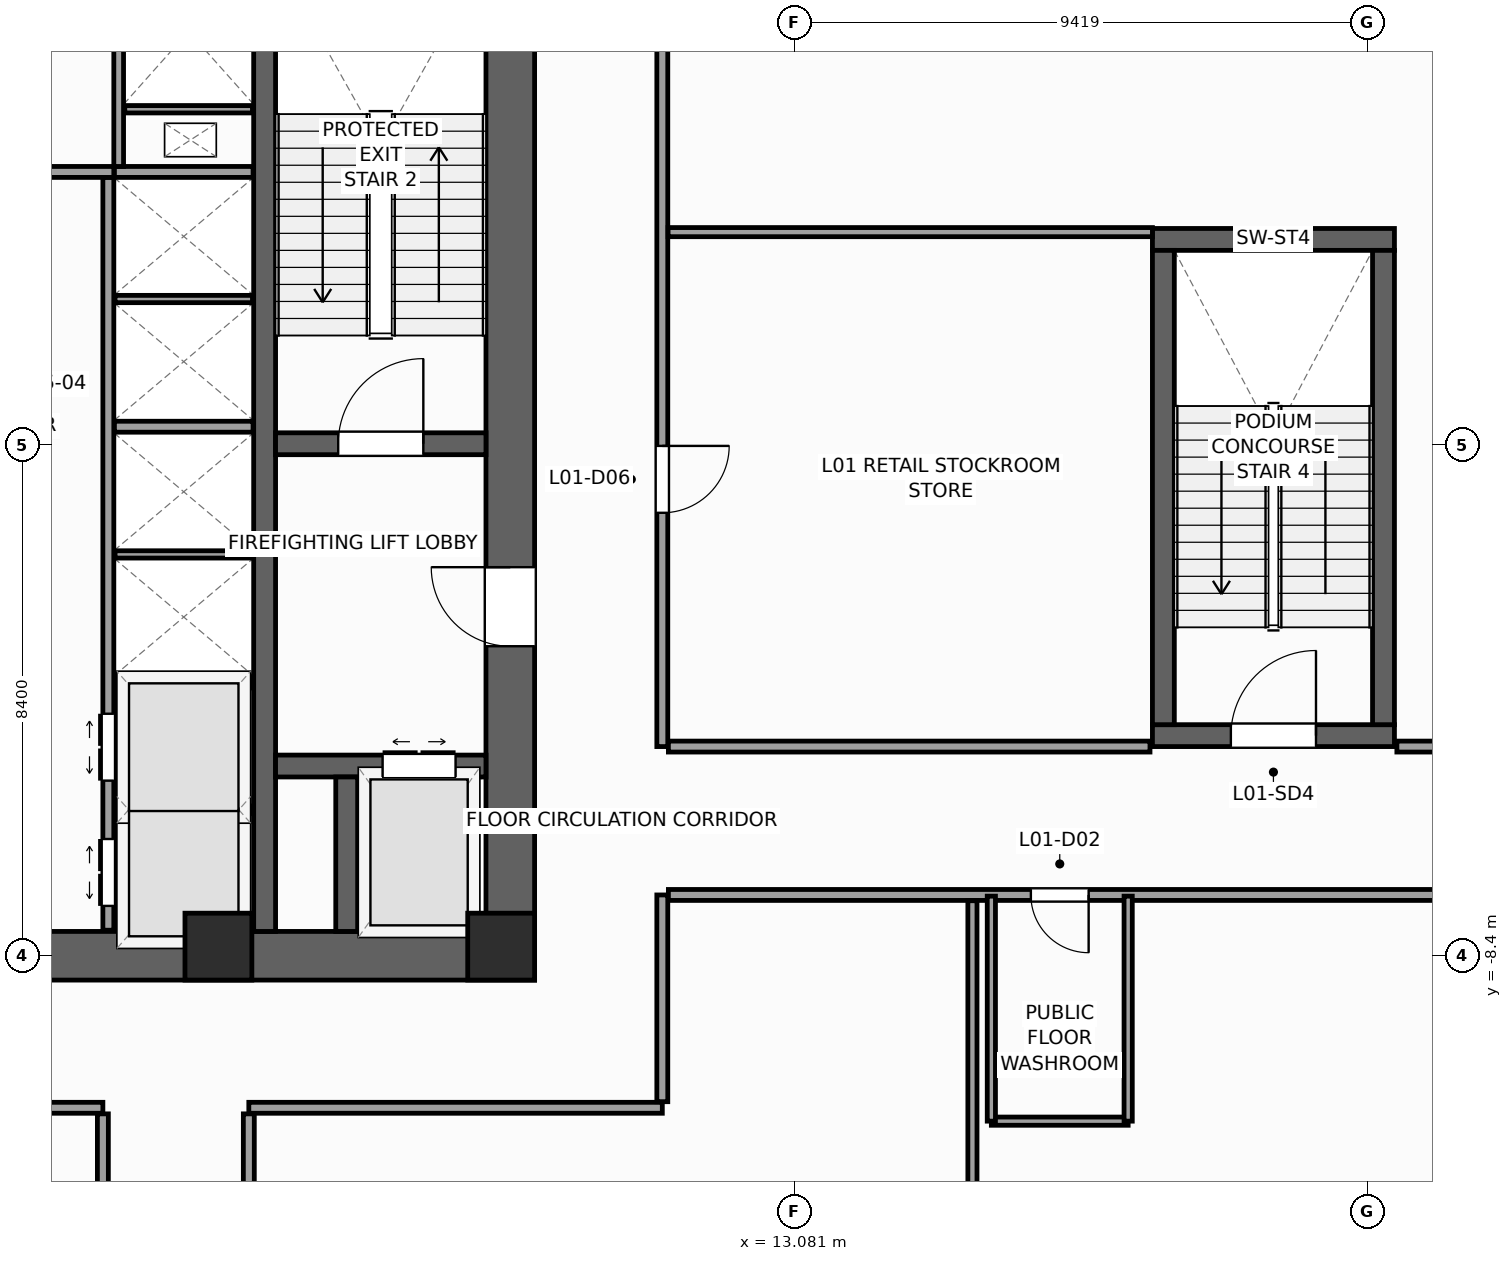
"""IFC4 building model, lengths in metres.
Left out: names, types, materials, properties, quantities, classifications, styles, units other than length and angle.
Written with IfcOpenShell. Run it as: python <this file> out.ifc"""

import sys

from ifc_helpers import new_model, si_unit, direction, frame, frame_2d, origin, origin_2d, place, context, subcontext, project, spatial, rectangle, extrude, source, transform, mapped, element, fill, save


model = new_model("IFC4")
c1 = context("Model", 3, precision=1e-05, world=origin(), true_north=direction((0.0, 1.0)))
c2 = subcontext(c1, "Body", "Model", "MODEL_VIEW")
j1 = project(units=[si_unit("LENGTHUNIT", "METRE"), si_unit("PLANEANGLEUNIT", "RADIAN")], contexts=[c1])
p1 = place(None, origin())
s1 = spatial("IfcSite", under=j1, at=p1, CompositionType="ELEMENT")
p2 = place(p1, origin())
s2 = spatial("IfcBuilding", under=s1, at=p2, CompositionType="ELEMENT")
p3 = place(p2, frame((0.0, 0.0, 6.0)))
s3 = spatial("IfcBuildingStorey", under=s2, at=p3, CompositionType="ELEMENT", Elevation=6.0)
p4 = place(p3, frame((-8.8, -8.4, 0.0), z_axis=(0.0, 0.0, 1.0), x_axis=(1.0, 0.0, 0.0)))
e1 = element("IfcWall", 1, at=p4, inside=s3, PredefinedType="SHEAR", context=c2, shape_type="SweptSolid", body=[
    extrude(rectangle(XDim=17.6, YDim=0.8, at=frame_2d((8.8, 0.0))), origin(), (0.0, 0.0, 1.0), 5.0),
])
p5 = place(p4, frame((8.15, 0.0, 0.0)))
e2 = element("IfcOpeningElement", 2, at=p5, cuts=e1, PredefinedType="OPENING", context=c2, shape_type="SweptSolid", body=[
    extrude(rectangle(XDim=1.3, YDim=2.2, at=frame_2d((0.65, 1.1))), frame((0.0, 0.41, 0.0), z_axis=(0.0, -1.0, 0.0), x_axis=(1.0, 0.0, 0.0)), (0.0, 0.0, 1.0), 0.82),
])
p6 = place(p3, frame((8.4, -8.0, 0.0), z_axis=(0.0, 0.0, 1.0), x_axis=(0.0, 1.0, 0.0)))
e3 = element("IfcWall", 3, at=p6, inside=s3, PredefinedType="SHEAR", context=c2, shape_type="SweptSolid", body=[
    extrude(rectangle(XDim=16.0, YDim=0.8, at=frame_2d((8.0, 0.0))), origin(), (0.0, 0.0, 1.0), 5.0),
])
p7 = place(p6, frame((4.69, 0.0, 0.0)))
e4 = element("IfcOpeningElement", 4, at=p7, cuts=e3, PredefinedType="OPENING", context=c2, shape_type="SweptSolid", body=[
    extrude(rectangle(XDim=1.3, YDim=2.2, at=frame_2d((0.65, 1.1))), frame((0.0, 0.41, 0.0), z_axis=(0.0, -1.0, 0.0), x_axis=(1.0, 0.0, 0.0)), (0.0, 0.0, 1.0), 0.82),
])
p8 = place(p3, frame((4.36, -8.0, 0.0), z_axis=(0.0, 0.0, 1.0), x_axis=(0.0, 1.0, 0.0)))
e5 = element("IfcWall", 5, at=p8, inside=s3, PredefinedType="SHEAR", context=c2, shape_type="SweptSolid", body=[
    extrude(rectangle(XDim=16.0, YDim=0.36, at=frame_2d((8.0, 0.0))), origin(), (0.0, 0.0, 1.0), 5.0),
])
p9 = place(p3, frame((4.54, 0.02, 0.0), z_axis=(0.0, 0.0, 1.0), x_axis=(1.0, 0.0, 0.0)))
e6 = element("IfcWall", 6, at=p9, inside=s3, PredefinedType="SHEAR", context=c2, shape_type="SweptSolid", body=[
    extrude(rectangle(XDim=3.46, YDim=0.36, at=frame_2d((1.73, 0.0))), origin(), (0.0, 0.0, 1.0), 5.0),
])
p10 = place(p9, frame((1.03, 0.0, 0.0)))
e7 = element("IfcOpeningElement", 7, at=p10, cuts=e6, PredefinedType="OPENING", context=c2, shape_type="SweptSolid", body=[
    extrude(rectangle(XDim=1.4, YDim=2.2, at=frame_2d((0.7, 1.1))), frame((0.0, 0.19, 0.0), z_axis=(0.0, -1.0, 0.0), x_axis=(1.0, 0.0, 0.0)), (0.0, 0.0, 1.0), 0.38),
])
p11 = place(p3, frame((4.54, -5.28, 0.0), z_axis=(0.0, 0.0, 1.0), x_axis=(1.0, 0.0, 0.0)))
e8 = element("IfcWall", 8, at=p11, inside=s3, PredefinedType="SHEAR", context=c2, shape_type="SweptSolid", body=[
    extrude(rectangle(XDim=3.46, YDim=0.36, at=frame_2d((1.73, 0.0))), origin(), (0.0, 0.0, 1.0), 5.0),
])
p12 = place(p11, frame((1.76, 0.0, 0.0)))
e9 = element("IfcOpeningElement", 9, at=p12, cuts=e8, PredefinedType="OPENING", context=c2, shape_type="SweptSolid", body=[
    extrude(rectangle(XDim=1.2, YDim=2.25, at=frame_2d((0.6, 1.125))), frame((0.0, 0.19, 0.0), z_axis=(0.0, -1.0, 0.0), x_axis=(1.0, 0.0, 0.0)), (0.0, 0.0, 1.0), 0.38),
])
p13 = place(p3, frame((5.71, -8.0, 0.0), z_axis=(0.0, 0.0, 1.0), x_axis=(0.0, 1.0, 0.0)))
e10 = element("IfcWall", 10, at=p13, inside=s3, PredefinedType="SHEAR", context=c2, shape_type="SweptSolid", body=[
    extrude(rectangle(XDim=2.54, YDim=0.36, at=frame_2d((1.27, 0.0))), origin(), (0.0, 0.0, 1.0), 5.0),
])
p14 = place(p3, frame((18.96, -4.78, 0.0), z_axis=(0.0, 0.0, 1.0), x_axis=(1.0, 0.0, 0.0)))
e11 = element("IfcWall", 11, at=p14, inside=s3, PredefinedType="SHEAR", context=c2, shape_type="SweptSolid", body=[
    extrude(rectangle(XDim=3.98, YDim=0.36, at=frame_2d((1.99, 0.0))), origin(), (0.0, 0.0, 1.0), 5.0),
])
p15 = place(p14, frame((1.29, 0.0, 0.0)))
e12 = element("IfcOpeningElement", 12, at=p15, cuts=e11, PredefinedType="OPENING", context=c2, shape_type="SweptSolid", body=[
    extrude(rectangle(XDim=1.4, YDim=2.2, at=frame_2d((0.7, 1.1))), frame((0.0, 0.19, 0.0), z_axis=(0.0, -1.0, 0.0), x_axis=(1.0, 0.0, 0.0)), (0.0, 0.0, 1.0), 0.38),
])
p16 = place(p3, frame((18.96, 3.38, 0.0), z_axis=(0.0, 0.0, 1.0), x_axis=(1.0, 0.0, 0.0)))
e13 = element("IfcWall", 13, at=p16, inside=s3, PredefinedType="SHEAR", context=c2, shape_type="SweptSolid", body=[
    extrude(rectangle(XDim=3.98, YDim=0.36, at=frame_2d((1.99, 0.0))), origin(), (0.0, 0.0, 1.0), 5.0),
])
for number, where, z_axis, x_axis in (
    (14, (19.14, -4.6, 0.0), (0.0, 0.0, 1.0), (0.0, 1.0, 0.0)),
    (15, (22.76, -4.6, 0.0), (0.0, 0.0, 1.0), (0.0, 1.0, 0.0)),
):
    element("IfcWall", number, at=place(p3, frame(where, z_axis=z_axis, x_axis=x_axis)), inside=s3, PredefinedType="SHEAR", context=c2, shape_type="SweptSolid", body=[
        extrude(rectangle(XDim=7.8, YDim=0.36, at=frame_2d((3.9, 0.0))), origin(), (0.0, 0.0, 1.0), 5.0),
    ])
m1 = source(origin(), c2, "Body", "SweptSolid", [
    extrude(rectangle(XDim=1.1, YDim=1.1, at=origin_2d()), origin(), (0.0, 0.0, 1.0), 5.0),
])
for number, where, z_axis, x_axis in (
    (16, (8.25, -8.25, 0.0), (0.0, 0.0, 1.0), (1.0, 0.0, 0.0)),
    (17, (3.6, -8.25, 0.0), (0.0, 0.0, 1.0), (1.0, 0.0, 0.0)),
):
    element("IfcColumn", number, at=place(p3, frame(where, z_axis=z_axis, x_axis=x_axis)), inside=s3, PredefinedType="PILASTER", context=c2, shape_type="MappedRepresentation", body=[
        mapped(m1, transform((0.0, 0.0, 0.0), scale=1.0)),
    ])
p17 = place(p3, frame((1.79, -7.98, 0.0), z_axis=(0.0, 0.0, 1.0), x_axis=(0.0, 1.0, 0.0)))
e18 = element("IfcWall", 18, at=p17, inside=s3, PredefinedType="PARTITIONING", context=c2, shape_type="SweptSolid", body=[
    extrude(rectangle(XDim=12.38, YDim=0.18, at=frame_2d((6.19, 0.0))), origin(), (0.0, 0.0, 1.0), 4.66),
])
p18 = place(p17, frame((0.4, 0.0, 0.0)))
e19 = element("IfcOpeningElement", 19, at=p18, cuts=e18, PredefinedType="OPENING", context=c2, shape_type="SweptSolid", body=[
    extrude(rectangle(XDim=1.1, YDim=2.2, at=frame_2d((0.55, 1.1))), frame((0.0, 0.1, 0.0), z_axis=(0.0, -1.0, 0.0), x_axis=(1.0, 0.0, 0.0)), (0.0, 0.0, 1.0), 0.2),
])
p19 = place(p17, frame((2.46, 0.0, 0.0)))
e20 = element("IfcOpeningElement", 20, at=p19, cuts=e18, PredefinedType="OPENING", context=c2, shape_type="SweptSolid", body=[
    extrude(rectangle(XDim=1.1, YDim=2.2, at=frame_2d((0.55, 1.1))), frame((0.0, 0.1, 0.0), z_axis=(0.0, -1.0, 0.0), x_axis=(1.0, 0.0, 0.0)), (0.0, 0.0, 1.0), 0.2),
])
p20 = place(p3, frame((-1.88, 4.49, 0.0), z_axis=(0.0, 0.0, 1.0), x_axis=(1.0, 0.0, 0.0)))
e21 = element("IfcWall", 21, at=p20, inside=s3, PredefinedType="PARTITIONING", context=c2, shape_type="SweptSolid", body=[
    extrude(rectangle(XDim=3.76, YDim=0.18, at=frame_2d((1.88, 0.0))), origin(), (0.0, 0.0, 1.0), 4.66),
])
p21 = place(p20, frame((1.305, 0.0, 0.0)))
e22 = element("IfcOpeningElement", 22, at=p21, cuts=e21, PredefinedType="OPENING", context=c2, shape_type="SweptSolid", body=[
    extrude(rectangle(XDim=1.15, YDim=2.25, at=frame_2d((0.575, 1.125))), frame((0.0, 0.1, 0.0), z_axis=(0.0, -1.0, 0.0), x_axis=(1.0, 0.0, 0.0)), (0.0, 0.0, 1.0), 0.2),
])
for number, where, z_axis, x_axis in (
    (23, (1.89, -3.9, 0.0), (0.0, 0.0, 1.0), (1.0, 0.0, 0.0)),
    (24, (1.89, 0.3, 0.0), (0.0, 0.0, 1.0), (1.0, 0.0, 0.0)),
    (25, (1.89, 4.49, 0.0), (0.0, 0.0, 1.0), (1.0, 0.0, 0.0)),
):
    element("IfcWall", number, at=place(p3, frame(where, z_axis=z_axis, x_axis=x_axis)), inside=s3, PredefinedType="PARTITIONING", context=c2, shape_type="SweptSolid", body=[
        extrude(rectangle(XDim=2.28, YDim=0.18, at=frame_2d((1.14, 0.0))), origin(), (0.0, 0.0, 1.0), 4.66),
    ])
for number, where, z_axis, x_axis in (
    (26, (1.9, -6.0, 0.0), (0.0, 0.0, 1.0), (1.0, 0.0, 0.0)),
    (27, (1.9, -1.8, 0.0), (0.0, 0.0, 1.0), (1.0, 0.0, 0.0)),
    (28, (1.9, 2.4, 0.0), (0.0, 0.0, 1.0), (1.0, 0.0, 0.0)),
):
    element("IfcWall", number, at=place(p3, frame(where, z_axis=z_axis, x_axis=x_axis)), inside=s3, PredefinedType="PARTITIONING", context=c2, shape_type="SweptSolid", body=[
        extrude(rectangle(XDim=2.26, YDim=0.12, at=frame_2d((1.13, 0.0))), origin(), (0.0, 0.0, 1.0), 4.66),
    ])
p22 = place(p3, frame((1.96, 4.58, 0.0), z_axis=(0.0, 0.0, 1.0), x_axis=(0.0, 1.0, 0.0)))
e29 = element("IfcWall", 29, at=p22, inside=s3, PredefinedType="PARTITIONING", context=c2, shape_type="SweptSolid", body=[
    extrude(rectangle(XDim=3.4, YDim=0.16, at=frame_2d((1.7, 0.0))), origin(), (0.0, 0.0, 1.0), 4.66),
])
p23 = place(p3, frame((2.06, 5.52, 0.0), z_axis=(0.0, 0.0, 1.0), x_axis=(1.0, 0.0, 0.0)))
e30 = element("IfcWall", 30, at=p23, inside=s3, PredefinedType="PARTITIONING", context=c2, shape_type="SweptSolid", body=[
    extrude(rectangle(XDim=2.1, YDim=0.12, at=frame_2d((1.05, 0.0))), origin(), (0.0, 0.0, 1.0), 4.66),
])
p24 = place(p3, frame((-10.9, -10.9, 0.0), z_axis=(0.0, 0.0, 1.0), x_axis=(1.0, 0.0, 0.0)))
e31 = element("IfcWall", 31, at=p24, inside=s3, PredefinedType="PARTITIONING", context=c2, shape_type="SweptSolid", body=[
    extrude(rectangle(XDim=12.6, YDim=0.18, at=frame_2d((6.3, 0.0))), origin(), (0.0, 0.0, 1.0), 4.66),
])
p25 = place(p3, frame((4.1, -10.9, 0.0), z_axis=(0.0, 0.0, 1.0), x_axis=(1.0, 0.0, 0.0)))
e32 = element("IfcWall", 32, at=p25, inside=s3, PredefinedType="PARTITIONING", context=c2, shape_type="SweptSolid", body=[
    extrude(rectangle(XDim=6.8, YDim=0.18, at=frame_2d((3.4, 0.0))), origin(), (0.0, 0.0, 1.0), 4.66),
])
p26 = place(p3, frame((10.9, -10.8, 0.0), z_axis=(0.0, 0.0, 1.0), x_axis=(0.0, 1.0, 0.0)))
e33 = element("IfcWall", 33, at=p26, inside=s3, PredefinedType="PARTITIONING", context=c2, shape_type="SweptSolid", body=[
    extrude(rectangle(XDim=3.4, YDim=0.18, at=frame_2d((1.7, 0.0))), origin(), (0.0, 0.0, 1.0), 4.66),
])
p27 = place(p3, frame((10.9, -4.96, 0.0), z_axis=(0.0, 0.0, 1.0), x_axis=(0.0, 1.0, 0.0)))
e34 = element("IfcWall", 34, at=p27, inside=s3, PredefinedType="PARTITIONING", context=c2, shape_type="SweptSolid", body=[
    extrude(rectangle(XDim=15.76, YDim=0.18, at=frame_2d((7.88, 0.0))), origin(), (0.0, 0.0, 1.0), 4.66),
])
p28 = place(p27, frame((3.844, 0.0, 0.0)))
e35 = element("IfcOpeningElement", 35, at=p28, cuts=e34, PredefinedType="OPENING", context=c2, shape_type="SweptSolid", body=[
    extrude(rectangle(XDim=1.1, YDim=2.2, at=frame_2d((0.55, 1.1))), frame((0.0, 0.1, 0.0), z_axis=(0.0, -1.0, 0.0), x_axis=(1.0, 0.0, 0.0)), (0.0, 0.0, 1.0), 0.2),
])
p29 = place(p3, frame((11.0, -7.4, 0.0), z_axis=(0.0, 0.0, 1.0), x_axis=(1.0, 0.0, 0.0)))
e36 = element("IfcWall", 36, at=p29, inside=s3, PredefinedType="PARTITIONING", context=c2, shape_type="SweptSolid", body=[
    extrude(rectangle(XDim=27.665, YDim=0.18, at=frame_2d((13.833, 0.0))), origin(), (0.0, 0.0, 1.0), 4.66),
])
p30 = place(p29, frame((5.961, 0.0, 0.0)))
e37 = element("IfcOpeningElement", 37, at=p30, cuts=e36, PredefinedType="OPENING", context=c2, shape_type="SweptSolid", body=[
    extrude(rectangle(XDim=0.95, YDim=2.1, at=frame_2d((0.475, 1.05))), frame((0.0, 0.1, 0.0), z_axis=(0.0, -1.0, 0.0), x_axis=(1.0, 0.0, 0.0)), (0.0, 0.0, 1.0), 0.2),
])
p31 = place(p29, frame((16.893, 0.0, 0.0)))
e38 = element("IfcOpeningElement", 38, at=p31, cuts=e36, PredefinedType="OPENING", context=c2, shape_type="SweptSolid", body=[
    extrude(rectangle(XDim=1.1, YDim=2.2, at=frame_2d((0.55, 1.1))), frame((0.0, 0.1, 0.0), z_axis=(0.0, -1.0, 0.0), x_axis=(1.0, 0.0, 0.0)), (0.0, 0.0, 1.0), 0.2),
])
p32 = place(p3, frame((11.0, -4.96, 0.0), z_axis=(0.0, 0.0, 1.0), x_axis=(1.0, 0.0, 0.0)))
e39 = element("IfcWall", 39, at=p32, inside=s3, PredefinedType="PARTITIONING", context=c2, shape_type="SweptSolid", body=[
    extrude(rectangle(XDim=7.92, YDim=0.18, at=frame_2d((3.96, 0.0))), origin(), (0.0, 0.0, 1.0), 4.66),
])
p33 = place(p3, frame((22.98, -4.96, 0.0), z_axis=(0.0, 0.0, 1.0), x_axis=(1.0, 0.0, 0.0)))
e40 = element("IfcWall", 40, at=p33, inside=s3, PredefinedType="PARTITIONING", context=c2, shape_type="SweptSolid", body=[
    extrude(rectangle(XDim=15.685, YDim=0.18, at=frame_2d((7.843, 0.0))), origin(), (0.0, 0.0, 1.0), 4.66),
])
p34 = place(p33, frame((7.292, 0.0, 0.0)))
e41 = element("IfcOpeningElement", 41, at=p34, cuts=e40, PredefinedType="OPENING", context=c2, shape_type="SweptSolid", body=[
    extrude(rectangle(XDim=1.1, YDim=2.2, at=frame_2d((0.55, 1.1))), frame((0.0, 0.1, 0.0), z_axis=(0.0, -1.0, 0.0), x_axis=(1.0, 0.0, 0.0)), (0.0, 0.0, 1.0), 0.2),
])
p35 = place(p3, frame((1.7, -25.665, 0.0), z_axis=(0.0, 0.0, 1.0), x_axis=(0.0, 1.0, 0.0)))
e42 = element("IfcWall", 42, at=p35, inside=s3, PredefinedType="PARTITIONING", context=c2, shape_type="SweptSolid", body=[
    extrude(rectangle(XDim=14.665, YDim=0.18, at=frame_2d((7.333, 0.0))), origin(), (0.0, 0.0, 1.0), 4.66),
])
p36 = place(p35, frame((6.782, 0.0, 0.0)))
e43 = element("IfcOpeningElement", 43, at=p36, cuts=e42, PredefinedType="OPENING", context=c2, shape_type="SweptSolid", body=[
    extrude(rectangle(XDim=1.1, YDim=2.2, at=frame_2d((0.55, 1.1))), frame((0.0, 0.1, 0.0), z_axis=(0.0, -1.0, 0.0), x_axis=(1.0, 0.0, 0.0)), (0.0, 0.0, 1.0), 0.2),
])
p37 = place(p3, frame((4.1, -25.665, 0.0), z_axis=(0.0, 0.0, 1.0), x_axis=(0.0, 1.0, 0.0)))
e44 = element("IfcWall", 44, at=p37, inside=s3, PredefinedType="PARTITIONING", context=c2, shape_type="SweptSolid", body=[
    extrude(rectangle(XDim=14.665, YDim=0.18, at=frame_2d((7.333, 0.0))), origin(), (0.0, 0.0, 1.0), 4.66),
])
p38 = place(p37, frame((6.782, 0.0, 0.0)))
e45 = element("IfcOpeningElement", 45, at=p38, cuts=e44, PredefinedType="OPENING", context=c2, shape_type="SweptSolid", body=[
    extrude(rectangle(XDim=1.1, YDim=2.2, at=frame_2d((0.55, 1.1))), frame((0.0, 0.1, 0.0), z_axis=(0.0, -1.0, 0.0), x_axis=(1.0, 0.0, 0.0)), (0.0, 0.0, 1.0), 0.2),
])
p39 = place(p3, frame((10.995, 3.5, 0.0), z_axis=(0.0, 0.0, 1.0), x_axis=(1.0, 0.0, 0.0)))
e46 = element("IfcWall", 46, at=p39, inside=s3, PredefinedType="PARTITIONING", context=c2, shape_type="SweptSolid", body=[
    extrude(rectangle(XDim=7.965, YDim=0.15, at=frame_2d((3.982, 0.0))), origin(), (0.0, 0.0, 1.0), 4.66),
])
p40 = place(p3, frame((16.0, -25.665, 0.0), z_axis=(0.0, 0.0, 1.0), x_axis=(0.0, 1.0, 0.0)))
e47 = element("IfcWall", 47, at=p40, inside=s3, PredefinedType="PARTITIONING", context=c2, shape_type="SweptSolid", body=[
    extrude(rectangle(XDim=18.17, YDim=0.15, at=frame_2d((9.085, 0.0))), origin(), (0.0, 0.0, 1.0), 4.66),
])
p41 = place(p3, frame((16.311, -11.12, 0.0), z_axis=(0.0, 0.0, 1.0), x_axis=(1.0, 0.0, 0.0)))
e48 = element("IfcWall", 48, at=p41, inside=s3, PredefinedType="PARTITIONING", context=c2, shape_type="SweptSolid", body=[
    extrude(rectangle(XDim=2.25, YDim=0.135, at=frame_2d((1.125, 0.0))), origin(), (0.0, 0.0, 1.0), 4.66),
])
for number, where, z_axis, x_axis in (
    (49, (18.561, -11.12, 0.0), (0.0, 0.0, 1.0), (0.0, 1.0, 0.0)),
    (50, (16.311, -11.12, 0.0), (0.0, 0.0, 1.0), (0.0, 1.0, 0.0)),
):
    element("IfcWall", number, at=place(p3, frame(where, z_axis=z_axis, x_axis=x_axis)), inside=s3, PredefinedType="PARTITIONING", context=c2, shape_type="SweptSolid", body=[
        extrude(rectangle(XDim=3.7, YDim=0.135, at=frame_2d((1.85, 0.0))), origin(), (0.0, 0.0, 1.0), 4.66),
    ])
m2 = source(origin(), c2, "Body", "SweptSolid", [
    extrude(rectangle(XDim=1.4, YDim=2.2, at=frame_2d((0.7, 1.1))), frame((0.0, 0.025, 0.0), z_axis=(0.0, -1.0, 0.0), x_axis=(1.0, 0.0, 0.0)), (0.0, 0.0, 1.0), 0.05),
])
p42 = place(p10, origin())
e51 = element("IfcDoor", 51, at=p42, inside=s3, OperationType="SINGLE_SWING_RIGHT", PredefinedType="DOOR", context=c2, shape_type="MappedRepresentation", body=[
    mapped(m2, transform((0.0, 0.0, 0.0), scale=1.0)),
])
fill(e7, e51)
m3 = source(origin(), c2, "Body", "SweptSolid", [
    extrude(rectangle(XDim=1.3, YDim=2.2, at=frame_2d((0.65, 1.1))), frame((0.0, 0.025, 0.0), z_axis=(0.0, -1.0, 0.0), x_axis=(1.0, 0.0, 0.0)), (0.0, 0.0, 1.0), 0.05),
])
p43 = place(p7, origin())
e52 = element("IfcDoor", 52, at=p43, inside=s3, OperationType="SINGLE_SWING_RIGHT", PredefinedType="DOOR", context=c2, shape_type="MappedRepresentation", body=[
    mapped(m3, transform((0.0, 0.0, 0.0), scale=1.0)),
])
fill(e4, e52)
m4 = source(origin(), c2, "Body", "SweptSolid", [
    extrude(rectangle(XDim=1.2, YDim=2.25, at=frame_2d((0.6, 1.125))), frame((0.0, 0.025, 0.0), z_axis=(0.0, -1.0, 0.0), x_axis=(1.0, 0.0, 0.0)), (0.0, 0.0, 1.0), 0.05),
])
p44 = place(p12, origin())
e53 = element("IfcDoor", 53, at=p44, inside=s3, OperationType="DOUBLE_DOOR_SLIDING", PredefinedType="DOOR", context=c2, shape_type="MappedRepresentation", body=[
    mapped(m4, transform((0.0, 0.0, 0.0), scale=1.0)),
])
fill(e9, e53)
m5 = source(origin(), c2, "Body", "SweptSolid", [
    extrude(rectangle(XDim=1.1, YDim=2.2, at=frame_2d((0.55, 1.1))), frame((0.0, 0.025, 0.0), z_axis=(0.0, -1.0, 0.0), x_axis=(1.0, 0.0, 0.0)), (0.0, 0.0, 1.0), 0.05),
])
p45 = place(p18, origin())
e54 = element("IfcDoor", 54, at=p45, inside=s3, OperationType="DOUBLE_DOOR_SLIDING", PredefinedType="DOOR", context=c2, shape_type="MappedRepresentation", body=[
    mapped(m5, transform((0.0, 0.0, 0.0), scale=1.0)),
])
fill(e19, e54)
p46 = place(p19, origin())
e55 = element("IfcDoor", 55, at=p46, inside=s3, OperationType="DOUBLE_DOOR_SLIDING", PredefinedType="DOOR", context=c2, shape_type="MappedRepresentation", body=[
    mapped(m5, transform((0.0, 0.0, 0.0), scale=1.0)),
])
fill(e20, e55)
p47 = place(p15, origin())
e56 = element("IfcDoor", 56, at=p47, inside=s3, OperationType="SINGLE_SWING_RIGHT", PredefinedType="DOOR", context=c2, shape_type="MappedRepresentation", body=[
    mapped(m2, transform((0.0, 0.0, 0.0), scale=1.0)),
])
fill(e12, e56)
m6 = source(origin(), c2, "Body", "SweptSolid", [
    extrude(rectangle(XDim=0.95, YDim=2.1, at=frame_2d((0.475, 1.05))), frame((0.0, 0.025, 0.0), z_axis=(0.0, -1.0, 0.0), x_axis=(1.0, 0.0, 0.0)), (0.0, 0.0, 1.0), 0.05),
])
p48 = place(p30, frame((0.95, 0.0, 0.0), z_axis=(0.0, 0.0, 1.0), x_axis=(-1.0, 0.0, 0.0)))
e57 = element("IfcDoor", 57, at=p48, inside=s3, OperationType="SINGLE_SWING_RIGHT", PredefinedType="DOOR", context=c2, shape_type="MappedRepresentation", body=[
    mapped(m6, transform((0.0, 0.0, 0.0), scale=1.0)),
])
fill(e37, e57)
p49 = place(p28, frame((1.1, 0.0, 0.0), z_axis=(0.0, 0.0, 1.0), x_axis=(-1.0, 0.0, 0.0)))
e58 = element("IfcDoor", 58, at=p49, inside=s3, OperationType="SINGLE_SWING_RIGHT", PredefinedType="DOOR", context=c2, shape_type="MappedRepresentation", body=[
    mapped(m5, transform((0.0, 0.0, 0.0), scale=1.0)),
])
fill(e35, e58)
save(model, sys.argv[1])
